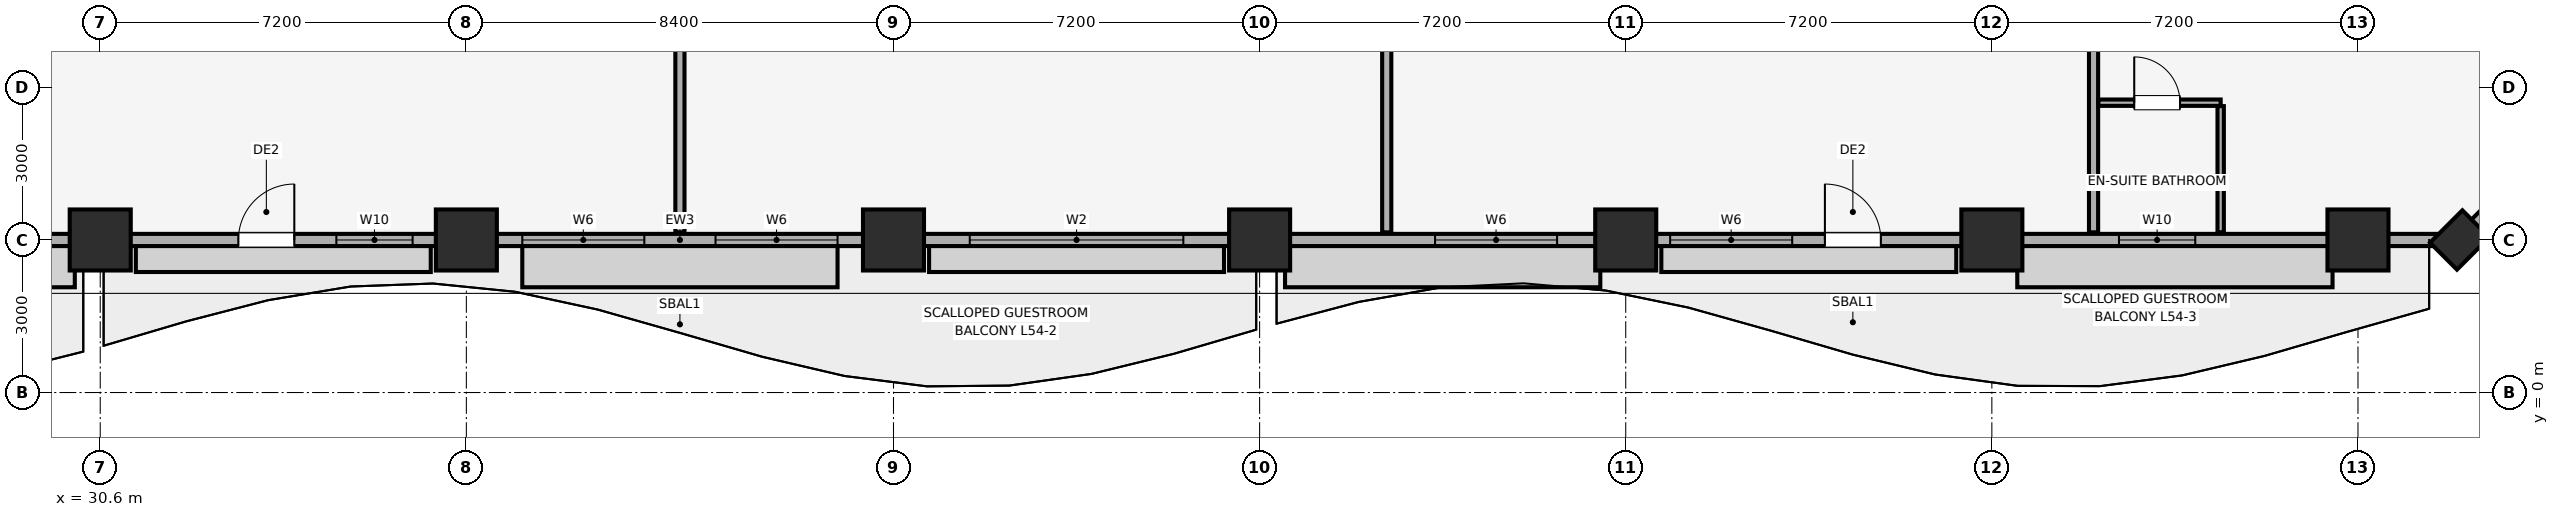
"""IFC4 building model, lengths in metres.
Left out: names, types, materials, properties, quantities, classifications, styles, units other than length and angle.
Written with IfcOpenShell. Run it as: python <this file> out.ifc"""

import sys

from ifc_helpers import new_model, si_unit, direction, frame, frame_2d, origin, origin_2d, place, context, subcontext, project, spatial, rectangle, extrude, element, fill, save


model = new_model("IFC4")
c1 = context("Model", 3, precision=1e-05, world=origin(), true_north=direction((0.0, 1.0)))
c2 = subcontext(c1, "Body", "Model", "MODEL_VIEW")
j1 = project(units=[si_unit("LENGTHUNIT", "METRE"), si_unit("PLANEANGLEUNIT", "RADIAN")], contexts=[c1])
p1 = place(None, origin())
s1 = spatial("IfcSite", under=j1, at=p1, CompositionType="ELEMENT")
p2 = place(p1, origin())
s2 = spatial("IfcBuilding", under=s1, at=p2, CompositionType="ELEMENT")
p3 = place(p2, frame((0.0, 0.0, 220.55)))
s3 = spatial("IfcBuildingStorey", under=s2, at=p3, CompositionType="ELEMENT", Elevation=220.55)
for number, where, z_axis, x_axis in (
    (1, (30.6, 3.0, 0.0), (0.0, 0.0, 1.0), (1.0, 0.0, 0.0)),
    (2, (37.8, 3.0, 0.0), (0.0, 0.0, 1.0), (1.0, 0.0, 0.0)),
    (3, (46.2, 3.0, 0.0), (0.0, 0.0, 1.0), (1.0, 0.0, 0.0)),
    (4, (53.4, 3.0, 0.0), (0.0, 0.0, 1.0), (1.0, 0.0, 0.0)),
    (5, (60.6, 3.0, 0.0), (0.0, 0.0, 1.0), (1.0, 0.0, 0.0)),
    (6, (67.8, 3.0, 0.0), (0.0, 0.0, 1.0), (1.0, 0.0, 0.0)),
    (7, (75.0, 3.0, 0.0), (0.0, 0.0, 1.0), (1.0, 0.0, 0.0)),
):
    element("IfcColumn", number, at=place(p3, frame(where, z_axis=z_axis, x_axis=x_axis)), inside=s3, PredefinedType="COLUMN", context=c2, shape_type="SweptSolid", body=[
        extrude(rectangle(XDim=1.2, YDim=1.2, at=origin_2d()), origin(), (0.0, 0.0, 1.0), 3.56),
    ])
p4 = place(p3, frame((77.0, 3.0, 0.0), z_axis=(0.0, 0.0, 1.0), x_axis=(0.707106781187, 0.707106781187, 0.0)))
e8 = element("IfcColumn", 8, at=p4, inside=s3, PredefinedType="PILASTER", context=c2, shape_type="SweptSolid", body=[
    extrude(rectangle(XDim=0.9, YDim=0.75, at=origin_2d()), origin(), (0.0, 0.0, 1.0), 3.56),
])
p5 = place(p3, frame((7.0, 3.0, 0.0), z_axis=(0.0, 0.0, 1.0), x_axis=(1.0, 0.0, 0.0)))
e9 = element("IfcWall", 9, at=p5, inside=s3, PredefinedType="SOLIDWALL", context=c2, shape_type="SweptSolid", body=[
    extrude(rectangle(XDim=70.0, YDim=0.24, at=frame_2d((35.0, 0.0))), origin(), (0.0, 0.0, 1.0), 2.76),
])
p6 = place(p5, frame((17.86, 0.0, 0.0)))
e10 = element("IfcOpeningElement", 10, at=p6, cuts=e9, PredefinedType="OPENING", context=c2, shape_type="SweptSolid", body=[
    extrude(rectangle(XDim=1.1, YDim=2.15, at=frame_2d((0.55, 1.075))), frame((0.0, 0.13, 0.0), z_axis=(0.0, -1.0, 0.0), x_axis=(1.0, 0.0, 0.0)), (0.0, 0.0, 1.0), 0.26),
])
p7 = place(p5, frame((26.317, 0.0, 0.0)))
e11 = element("IfcOpeningElement", 11, at=p7, cuts=e9, PredefinedType="OPENING", context=c2, shape_type="SweptSolid", body=[
    extrude(rectangle(XDim=1.1, YDim=2.15, at=frame_2d((0.55, 1.075))), frame((0.0, 0.13, 0.0), z_axis=(0.0, -1.0, 0.0), x_axis=(1.0, 0.0, 0.0)), (0.0, 0.0, 1.0), 0.26),
])
p8 = place(p5, frame((57.517, 0.0, 0.0)))
e12 = element("IfcOpeningElement", 12, at=p8, cuts=e9, PredefinedType="OPENING", context=c2, shape_type="SweptSolid", body=[
    extrude(rectangle(XDim=1.1, YDim=2.15, at=frame_2d((0.55, 1.075))), frame((0.0, 0.13, 0.0), z_axis=(0.0, -1.0, 0.0), x_axis=(1.0, 0.0, 0.0)), (0.0, 0.0, 1.0), 0.26),
])
p9 = place(p5, frame((5.2, 0.0, 0.85)))
e13 = element("IfcOpeningElement", 13, at=p9, cuts=e9, PredefinedType="OPENING", context=c2, shape_type="SweptSolid", body=[
    extrude(rectangle(XDim=1.5, YDim=1.4, at=frame_2d((0.75, 0.7))), frame((0.0, 0.13, 0.0), z_axis=(0.0, -1.0, 0.0), x_axis=(1.0, 0.0, 0.0)), (0.0, 0.0, 1.0), 0.26),
])
p10 = place(p5, frame((10.7, 0.0, 0.85)))
e14 = element("IfcOpeningElement", 14, at=p10, cuts=e9, PredefinedType="OPENING", context=c2, shape_type="SweptSolid", body=[
    extrude(rectangle(XDim=4.2, YDim=1.65, at=frame_2d((2.1, 0.825))), frame((0.0, 0.13, 0.0), z_axis=(0.0, -1.0, 0.0), x_axis=(1.0, 0.0, 0.0)), (0.0, 0.0, 1.0), 0.26),
])
p11 = place(p5, frame((28.243, 0.0, 0.85)))
e15 = element("IfcOpeningElement", 15, at=p11, cuts=e9, PredefinedType="OPENING", context=c2, shape_type="SweptSolid", body=[
    extrude(rectangle(XDim=1.5, YDim=1.4, at=frame_2d((0.75, 0.7))), frame((0.0, 0.13, 0.0), z_axis=(0.0, -1.0, 0.0), x_axis=(1.0, 0.0, 0.0)), (0.0, 0.0, 1.0), 0.26),
])
p12 = place(p5, frame((31.9, 0.0, 0.85)))
e16 = element("IfcOpeningElement", 16, at=p12, cuts=e9, PredefinedType="OPENING", context=c2, shape_type="SweptSolid", body=[
    extrude(rectangle(XDim=2.4, YDim=1.5, at=frame_2d((1.2, 0.75))), frame((0.0, 0.13, 0.0), z_axis=(0.0, -1.0, 0.0), x_axis=(1.0, 0.0, 0.0)), (0.0, 0.0, 1.0), 0.26),
])
p13 = place(p5, frame((35.7, 0.0, 0.85)))
e17 = element("IfcOpeningElement", 17, at=p13, cuts=e9, PredefinedType="OPENING", context=c2, shape_type="SweptSolid", body=[
    extrude(rectangle(XDim=2.4, YDim=1.5, at=frame_2d((1.2, 0.75))), frame((0.0, 0.13, 0.0), z_axis=(0.0, -1.0, 0.0), x_axis=(1.0, 0.0, 0.0)), (0.0, 0.0, 1.0), 0.26),
])
p14 = place(p5, frame((40.7, 0.0, 0.85)))
e18 = element("IfcOpeningElement", 18, at=p14, cuts=e9, PredefinedType="OPENING", context=c2, shape_type="SweptSolid", body=[
    extrude(rectangle(XDim=4.2, YDim=1.65, at=frame_2d((2.1, 0.825))), frame((0.0, 0.13, 0.0), z_axis=(0.0, -1.0, 0.0), x_axis=(1.0, 0.0, 0.0)), (0.0, 0.0, 1.0), 0.26),
])
p15 = place(p5, frame((49.85, 0.0, 0.85)))
e19 = element("IfcOpeningElement", 19, at=p15, cuts=e9, PredefinedType="OPENING", context=c2, shape_type="SweptSolid", body=[
    extrude(rectangle(XDim=2.4, YDim=1.5, at=frame_2d((1.2, 0.75))), frame((0.0, 0.13, 0.0), z_axis=(0.0, -1.0, 0.0), x_axis=(1.0, 0.0, 0.0)), (0.0, 0.0, 1.0), 0.26),
])
p16 = place(p5, frame((54.473, 0.0, 0.85)))
e20 = element("IfcOpeningElement", 20, at=p16, cuts=e9, PredefinedType="OPENING", context=c2, shape_type="SweptSolid", body=[
    extrude(rectangle(XDim=2.4, YDim=1.5, at=frame_2d((1.2, 0.75))), frame((0.0, 0.13, 0.0), z_axis=(0.0, -1.0, 0.0), x_axis=(1.0, 0.0, 0.0)), (0.0, 0.0, 1.0), 0.26),
])
p17 = place(p5, frame((63.3, 0.0, 0.85)))
e21 = element("IfcOpeningElement", 21, at=p17, cuts=e9, PredefinedType="OPENING", context=c2, shape_type="SweptSolid", body=[
    extrude(rectangle(XDim=1.5, YDim=1.4, at=frame_2d((0.75, 0.7))), frame((0.0, 0.13, 0.0), z_axis=(0.0, -1.0, 0.0), x_axis=(1.0, 0.0, 0.0)), (0.0, 0.0, 1.0), 0.26),
])
p18 = place(p3, frame((77.0, 3.0, 0.0), z_axis=(0.0, 0.0, 1.0), x_axis=(0.707106781187, 0.707106781187, 0.0)))
e22 = element("IfcWall", 22, at=p18, inside=s3, PredefinedType="SOLIDWALL", context=c2, shape_type="SweptSolid", body=[
    extrude(rectangle(XDim=5.657, YDim=0.24, at=frame_2d((2.828, 0.0))), origin(), (0.0, 0.0, 1.0), 2.76),
])
p19 = place(p18, frame((1.778, 0.0, 0.85)))
e23 = element("IfcOpeningElement", 23, at=p19, cuts=e22, PredefinedType="OPENING", context=c2, shape_type="SweptSolid", body=[
    extrude(rectangle(XDim=2.1, YDim=1.6, at=frame_2d((1.05, 0.8))), frame((0.0, 0.13, 0.0), z_axis=(0.0, -1.0, 0.0), x_axis=(1.0, 0.0, 0.0)), (0.0, 0.0, 1.0), 0.26),
])
p20 = place(p3, frame((42.0, 3.15, 0.0), z_axis=(0.0, 0.0, 1.0), x_axis=(0.0, 1.0, 0.0)))
e24 = element("IfcWall", 24, at=p20, inside=s3, PredefinedType="PARTITIONING", context=c2, shape_type="SweptSolid", body=[
    extrude(rectangle(XDim=21.555, YDim=0.18, at=frame_2d((10.778, 0.0))), origin(), (0.0, 0.0, 1.0), 2.96),
])
for number, where, z_axis, x_axis in (
    (25, (55.9, 3.15, 0.0), (0.0, 0.0, 1.0), (0.0, 1.0, 0.0)),
    (26, (69.8, 3.15, 0.0), (0.0, 0.0, 1.0), (0.0, 1.0, 0.0)),
):
    element("IfcWall", number, at=place(p3, frame(where, z_axis=z_axis, x_axis=x_axis)), inside=s3, PredefinedType="PARTITIONING", context=c2, shape_type="SweptSolid", body=[
        extrude(rectangle(XDim=21.555, YDim=0.18, at=frame_2d((10.778, 0.0))), origin(), (0.0, 0.0, 1.0), 3.56),
    ])
p21 = place(p3, frame((69.895, 5.7, 0.0), z_axis=(0.0, 0.0, 1.0), x_axis=(1.0, 0.0, 0.0)))
e27 = element("IfcWall", 27, at=p21, inside=s3, PredefinedType="PARTITIONING", context=c2, shape_type="SweptSolid", body=[
    extrude(rectangle(XDim=2.405, YDim=0.125, at=frame_2d((1.203, 0.0))), origin(), (0.0, 0.0, 1.0), 3.56),
])
p22 = place(p21, frame((0.705, 0.0, 0.0)))
e28 = element("IfcOpeningElement", 28, at=p22, cuts=e27, PredefinedType="OPENING", context=c2, shape_type="SweptSolid", body=[
    extrude(rectangle(XDim=0.9, YDim=2.1, at=frame_2d((0.45, 1.05))), frame((0.0, 0.073, 0.0), z_axis=(0.0, -1.0, 0.0), x_axis=(1.0, 0.0, 0.0)), (0.0, 0.0, 1.0), 0.145),
])
p23 = place(p3, frame((72.3, 3.15, 0.0), z_axis=(0.0, 0.0, 1.0), x_axis=(0.0, 1.0, 0.0)))
e29 = element("IfcWall", 29, at=p23, inside=s3, PredefinedType="PARTITIONING", context=c2, shape_type="SweptSolid", body=[
    extrude(rectangle(XDim=2.483, YDim=0.125, at=frame_2d((1.241, 0.0))), origin(), (0.0, 0.0, 1.0), 3.56),
])
p24 = place(p7, origin())
e30 = element("IfcDoor", 30, at=p24, inside=s3, OperationType="SINGLE_SWING_RIGHT", PredefinedType="DOOR", context=c2, shape_type="SweptSolid", body=[
    extrude(rectangle(XDim=1.1, YDim=2.15, at=frame_2d((0.55, 1.075))), frame((0.0, 0.025, 0.0), z_axis=(0.0, -1.0, 0.0), x_axis=(1.0, 0.0, 0.0)), (0.0, 0.0, 1.0), 0.05),
])
fill(e11, e30)
p25 = place(p8, origin())
e31 = element("IfcDoor", 31, at=p25, inside=s3, OperationType="SINGLE_SWING_LEFT", PredefinedType="DOOR", context=c2, shape_type="SweptSolid", body=[
    extrude(rectangle(XDim=1.1, YDim=2.15, at=frame_2d((0.55, 1.075))), frame((0.0, 0.025, 0.0), z_axis=(0.0, -1.0, 0.0), x_axis=(1.0, 0.0, 0.0)), (0.0, 0.0, 1.0), 0.05),
])
fill(e12, e31)
p26 = place(p11, origin())
e32 = element("IfcWindow", 32, at=p26, inside=s3, PartitioningType="SINGLE_PANEL", PredefinedType="WINDOW", context=c2, shape_type="SweptSolid", body=[
    extrude(rectangle(XDim=1.5, YDim=1.4, at=frame_2d((0.75, 0.7))), frame((0.0, 0.03, 0.0), z_axis=(0.0, -1.0, 0.0), x_axis=(1.0, 0.0, 0.0)), (0.0, 0.0, 1.0), 0.06),
])
fill(e15, e32)
p27 = place(p12, origin())
e33 = element("IfcWindow", 33, at=p27, inside=s3, PartitioningType="SINGLE_PANEL", PredefinedType="WINDOW", context=c2, shape_type="SweptSolid", body=[
    extrude(rectangle(XDim=2.4, YDim=1.5, at=frame_2d((1.2, 0.75))), frame((0.0, 0.03, 0.0), z_axis=(0.0, -1.0, 0.0), x_axis=(1.0, 0.0, 0.0)), (0.0, 0.0, 1.0), 0.06),
])
fill(e16, e33)
p28 = place(p13, origin())
e34 = element("IfcWindow", 34, at=p28, inside=s3, PartitioningType="SINGLE_PANEL", PredefinedType="WINDOW", context=c2, shape_type="SweptSolid", body=[
    extrude(rectangle(XDim=2.4, YDim=1.5, at=frame_2d((1.2, 0.75))), frame((0.0, 0.03, 0.0), z_axis=(0.0, -1.0, 0.0), x_axis=(1.0, 0.0, 0.0)), (0.0, 0.0, 1.0), 0.06),
])
fill(e17, e34)
p29 = place(p14, origin())
e35 = element("IfcWindow", 35, at=p29, inside=s3, PartitioningType="SINGLE_PANEL", PredefinedType="WINDOW", context=c2, shape_type="SweptSolid", body=[
    extrude(rectangle(XDim=4.2, YDim=1.65, at=frame_2d((2.1, 0.825))), frame((0.0, 0.03, 0.0), z_axis=(0.0, -1.0, 0.0), x_axis=(1.0, 0.0, 0.0)), (0.0, 0.0, 1.0), 0.06),
])
fill(e18, e35)
p30 = place(p15, origin())
e36 = element("IfcWindow", 36, at=p30, inside=s3, PartitioningType="SINGLE_PANEL", PredefinedType="WINDOW", context=c2, shape_type="SweptSolid", body=[
    extrude(rectangle(XDim=2.4, YDim=1.5, at=frame_2d((1.2, 0.75))), frame((0.0, 0.03, 0.0), z_axis=(0.0, -1.0, 0.0), x_axis=(1.0, 0.0, 0.0)), (0.0, 0.0, 1.0), 0.06),
])
fill(e19, e36)
p31 = place(p16, origin())
e37 = element("IfcWindow", 37, at=p31, inside=s3, PartitioningType="SINGLE_PANEL", PredefinedType="WINDOW", context=c2, shape_type="SweptSolid", body=[
    extrude(rectangle(XDim=2.4, YDim=1.5, at=frame_2d((1.2, 0.75))), frame((0.0, 0.03, 0.0), z_axis=(0.0, -1.0, 0.0), x_axis=(1.0, 0.0, 0.0)), (0.0, 0.0, 1.0), 0.06),
])
fill(e20, e37)
p32 = place(p17, origin())
e38 = element("IfcWindow", 38, at=p32, inside=s3, PartitioningType="SINGLE_PANEL", PredefinedType="WINDOW", context=c2, shape_type="SweptSolid", body=[
    extrude(rectangle(XDim=1.5, YDim=1.4, at=frame_2d((0.75, 0.7))), frame((0.0, 0.03, 0.0), z_axis=(0.0, -1.0, 0.0), x_axis=(1.0, 0.0, 0.0)), (0.0, 0.0, 1.0), 0.06),
])
fill(e21, e38)
p33 = place(p22, origin())
e39 = element("IfcDoor", 39, at=p33, inside=s3, OperationType="SINGLE_SWING_LEFT", PredefinedType="DOOR", context=c2, shape_type="SweptSolid", body=[
    extrude(rectangle(XDim=0.9, YDim=2.1, at=frame_2d((0.45, 1.05))), frame((0.0, 0.025, 0.0), z_axis=(0.0, -1.0, 0.0), x_axis=(1.0, 0.0, 0.0)), (0.0, 0.0, 1.0), 0.05),
])
fill(e28, e39)
save(model, sys.argv[1])
